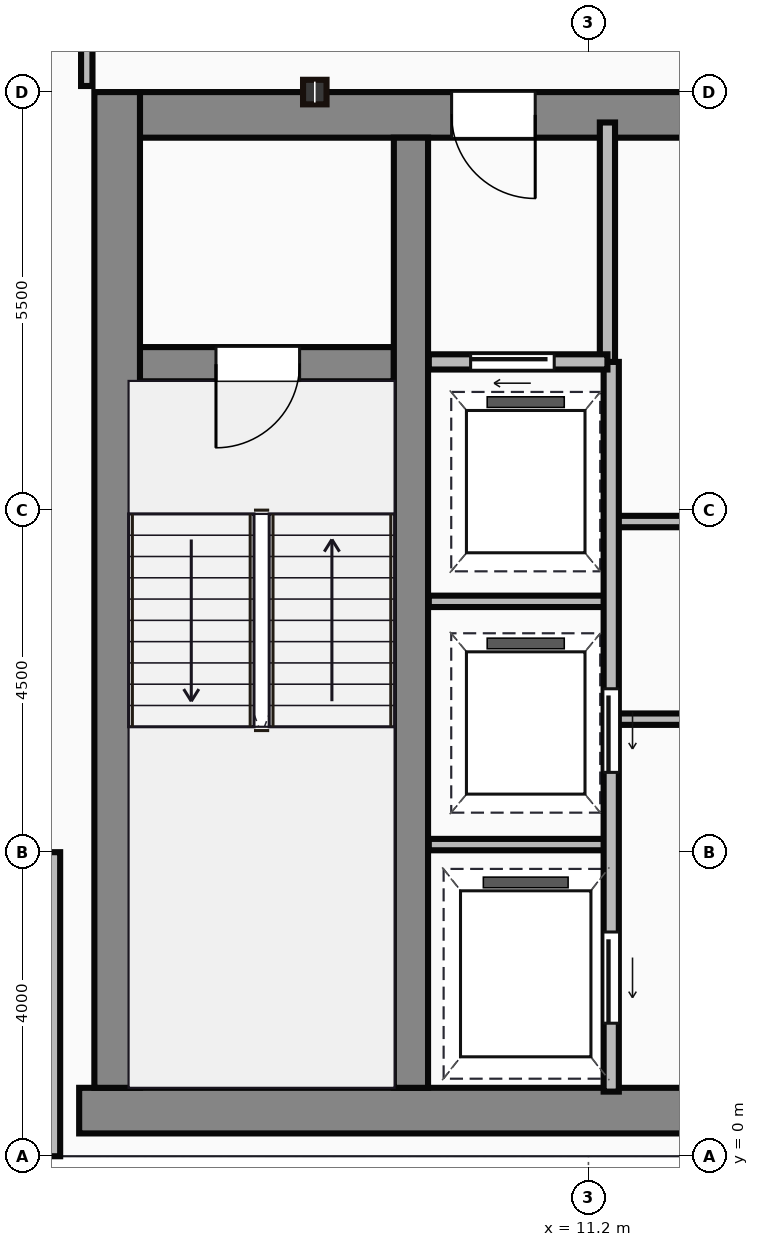
"""IFC4 building model, lengths in metres.
Left out: names, types, materials, properties, quantities, classifications, styles, units other than length and angle.
Written with IfcOpenShell. Run it as: python <this file> out.ifc"""

import sys

from ifc_helpers import new_model, si_unit, direction, frame, frame_2d, origin, origin_2d, place, context, subcontext, project, spatial, rectangle, i_section, extrude, source, transform, mapped, element, fill, save


model = new_model("IFC4")
c1 = context("Model", 3, precision=1e-05, world=origin(), true_north=direction((0.0, 1.0)))
c2 = subcontext(c1, "Body", "Model", "MODEL_VIEW")
j1 = project(units=[si_unit("LENGTHUNIT", "METRE"), si_unit("PLANEANGLEUNIT", "RADIAN")], contexts=[c1])
p1 = place(None, origin())
s1 = spatial("IfcSite", under=j1, at=p1, CompositionType="ELEMENT")
p2 = place(p1, origin())
s2 = spatial("IfcBuilding", under=s1, at=p2, CompositionType="ELEMENT")
p3 = place(p2, frame((0.0, 0.0, 206.85)))
s3 = spatial("IfcBuildingStorey", under=s2, at=p3, CompositionType="ELEMENT", Elevation=206.85)
m1 = source(origin(), c2, "Body", "SweptSolid", [
    extrude(rectangle(XDim=29.5, YDim=0.6, at=frame_2d((14.75, 0.0))), origin(), (0.0, 0.0, 1.0), 3.65),
])
p4 = place(p3, frame((4.5, 0.6, 0.0), z_axis=(0.0, 0.0, 1.0), x_axis=(1.0, 0.0, 0.0)))
e1 = element("IfcWall", 1, at=p4, inside=s3, PredefinedType="SHEAR", context=c2, shape_type="MappedRepresentation", body=[
    mapped(m1, transform((0.0, 0.0, 0.0))),
])
m2 = source(origin(), c2, "Body", "SweptSolid", [
    extrude(rectangle(XDim=13.1, YDim=0.6, at=frame_2d((6.55, 0.0))), origin(), (0.0, 0.0, 1.0), 3.65),
])
p5 = place(p3, frame((5.0, 0.9, 0.0), z_axis=(0.0, 0.0, 1.0), x_axis=(0.0, 1.0, 0.0)))
e2 = element("IfcWall", 2, at=p5, inside=s3, PredefinedType="SHEAR", context=c2, shape_type="MappedRepresentation", body=[
    mapped(m2, transform((0.0, 0.0, 0.0))),
])
m3 = source(origin(), c2, "Body", "SweptSolid", [
    extrude(rectangle(XDim=9.1, YDim=0.6, at=frame_2d((4.55, 0.0))), origin(), (0.0, 0.0, 1.0), 3.65),
])
p6 = place(p3, frame((5.3, 13.7, 0.0), z_axis=(0.0, 0.0, 1.0), x_axis=(1.0, 0.0, 0.0)))
e3 = element("IfcWall", 3, at=p6, inside=s3, PredefinedType="SHEAR", context=c2, shape_type="MappedRepresentation", body=[
    mapped(m3, transform((0.0, 0.0, 0.0))),
])
p7 = place(p6, frame((4.1, 0.0, 0.0)))
e4 = element("IfcOpeningElement", 4, at=p7, cuts=e3, PredefinedType="OPENING", context=c2, shape_type="SweptSolid", body=[
    extrude(rectangle(XDim=1.1, YDim=2.15, at=frame_2d((0.55, 1.075))), frame((0.0, 0.31, 0.0), z_axis=(0.0, -1.0, 0.0), x_axis=(1.0, 0.0, 0.0)), (0.0, 0.0, 1.0), 0.62),
])
m4 = source(origin(), c2, "Body", "SweptSolid", [
    extrude(rectangle(XDim=12.5, YDim=0.45, at=frame_2d((6.25, 0.0))), origin(), (0.0, 0.0, 1.0), 3.65),
])
p8 = place(p3, frame((8.865, 0.9, 0.0), z_axis=(0.0, 0.0, 1.0), x_axis=(0.0, 1.0, 0.0)))
e5 = element("IfcWall", 5, at=p8, inside=s3, PredefinedType="SHEAR", context=c2, shape_type="MappedRepresentation", body=[
    mapped(m4, transform((0.0, 0.0, 0.0))),
])
m5 = source(origin(), c2, "Body", "SweptSolid", [
    extrude(rectangle(XDim=3.39, YDim=0.45, at=frame_2d((1.695, 0.0))), origin(), (0.0, 0.0, 1.0), 3.65),
])
p9 = place(p3, frame((5.25, 10.42, 0.0), z_axis=(0.0, 0.0, 1.0), x_axis=(1.0, 0.0, 0.0)))
e6 = element("IfcWall", 6, at=p9, inside=s3, PredefinedType="SHEAR", context=c2, shape_type="MappedRepresentation", body=[
    mapped(m5, transform((0.0, 0.0, 0.0))),
])
p10 = place(p9, frame((1.05, 0.0, 0.0)))
e7 = element("IfcOpeningElement", 7, at=p10, cuts=e6, PredefinedType="OPENING", context=c2, shape_type="SweptSolid", body=[
    extrude(rectangle(XDim=1.1, YDim=2.15, at=frame_2d((0.55, 1.075))), frame((0.0, 0.235, 0.0), z_axis=(0.0, -1.0, 0.0), x_axis=(1.0, 0.0, 0.0)), (0.0, 0.0, 1.0), 0.47),
])
m6 = source(origin(), c2, "Body", "SweptSolid", [
    extrude(i_section(OverallWidth=0.309, OverallDepth=0.323, WebThickness=0.014, FlangeThickness=0.023, at=origin_2d()), origin(), (0.0, 0.0, 1.0), 3.65),
])
p11 = place(p3, frame((7.6, 14.0, 0.0), z_axis=(0.0, 0.0, 1.0), x_axis=(1.0, 0.0, 0.0)))
e8 = element("IfcColumn", 8, at=p11, inside=s3, PredefinedType="COLUMN", context=c2, shape_type="MappedRepresentation", body=[
    mapped(m6, transform((0.0, 0.0, 0.0))),
])
m7 = source(origin(), c2, "Body", "SweptSolid", [
    extrude(rectangle(XDim=4.0, YDim=0.25, at=frame_2d((2.0, 0.0))), origin(), (0.0, 0.0, 1.0), 3.4),
])
p12 = place(p3, frame((4.125, 4.0, 0.0), z_axis=(0.0, 0.0, 1.0), x_axis=(0.0, -1.0, 0.0)))
e9 = element("IfcWall", 9, at=p12, inside=s3, PredefinedType="STANDARD", context=c2, shape_type="MappedRepresentation", body=[
    mapped(m7, transform((0.0, 0.0, 0.0))),
])
m8 = source(origin(), c2, "Body", "SweptSolid", [
    extrude(rectangle(XDim=3.18, YDim=0.2, at=frame_2d((1.59, 0.0))), origin(), (0.0, 0.0, 1.0), 3.4),
])
p13 = place(p3, frame((11.45, 10.42, 0.0), z_axis=(0.0, 0.0, 1.0), x_axis=(0.0, 1.0, 0.0)))
e10 = element("IfcWall", 10, at=p13, inside=s3, PredefinedType="PARTITIONING", context=c2, shape_type="MappedRepresentation", body=[
    mapped(m8, transform((0.0, 0.0, 0.0))),
])
m9 = source(origin(), c2, "Body", "SweptSolid", [
    extrude(rectangle(XDim=2.35, YDim=0.2, at=frame_2d((1.175, 0.0))), origin(), (0.0, 0.0, 1.0), 3.4),
])
p14 = place(p3, frame((9.1, 10.45, 0.0), z_axis=(0.0, 0.0, 1.0), x_axis=(1.0, 0.0, 0.0)))
e11 = element("IfcWall", 11, at=p14, inside=s3, PredefinedType="PARTITIONING", context=c2, shape_type="MappedRepresentation", body=[
    mapped(m9, transform((0.0, 0.0, 0.0))),
])
p15 = place(p14, frame((0.55, 0.0, 0.0)))
e12 = element("IfcOpeningElement", 12, at=p15, cuts=e11, PredefinedType="OPENING", context=c2, shape_type="SweptSolid", body=[
    extrude(rectangle(XDim=1.1, YDim=2.15, at=frame_2d((0.55, 1.075))), frame((0.0, 0.11, 0.0), z_axis=(0.0, -1.0, 0.0), x_axis=(1.0, 0.0, 0.0)), (0.0, 0.0, 1.0), 0.22),
])
m10 = source(origin(), c2, "Body", "SweptSolid", [
    extrude(rectangle(XDim=9.6, YDim=0.2, at=frame_2d((4.8, 0.0))), origin(), (0.0, 0.0, 1.0), 3.4),
])
p16 = place(p3, frame((11.5, 0.85, 0.0), z_axis=(0.0, 0.0, 1.0), x_axis=(0.0, 1.0, 0.0)))
e13 = element("IfcWall", 13, at=p16, inside=s3, PredefinedType="PARTITIONING", context=c2, shape_type="MappedRepresentation", body=[
    mapped(m10, transform((0.0, 0.0, 0.0))),
])
p17 = place(p16, frame((4.2, 0.0, 0.0)))
e14 = element("IfcOpeningElement", 14, at=p17, cuts=e13, PredefinedType="OPENING", context=c2, shape_type="SweptSolid", body=[
    extrude(rectangle(XDim=1.1, YDim=2.15, at=frame_2d((0.55, 1.075))), frame((0.0, 0.11, 0.0), z_axis=(0.0, -1.0, 0.0), x_axis=(1.0, 0.0, 0.0)), (0.0, 0.0, 1.0), 0.22),
])
p18 = place(p16, frame((0.9, 0.0, 0.0)))
e15 = element("IfcOpeningElement", 15, at=p18, cuts=e13, PredefinedType="OPENING", context=c2, shape_type="SweptSolid", body=[
    extrude(rectangle(XDim=1.2, YDim=2.15, at=frame_2d((0.6, 1.075))), frame((0.0, 0.11, 0.0), z_axis=(0.0, -1.0, 0.0), x_axis=(1.0, 0.0, 0.0)), (0.0, 0.0, 1.0), 0.22),
])
m11 = source(origin(), c2, "Body", "SweptSolid", [
    extrude(rectangle(XDim=2.4, YDim=0.15, at=frame_2d((1.2, 0.0))), origin(), (0.0, 0.0, 1.0), 3.4),
])
for number, where, z_axis, x_axis in (
    (16, (9.1, 4.1, 0.0), (0.0, 0.0, 1.0), (1.0, 0.0, 0.0)),
    (17, (9.1, 7.3, 0.0), (0.0, 0.0, 1.0), (1.0, 0.0, 0.0)),
):
    element("IfcWall", number, at=place(p3, frame(where, z_axis=z_axis, x_axis=x_axis)), inside=s3, PredefinedType="PARTITIONING", context=c2, shape_type="MappedRepresentation", body=[
        mapped(m11, transform((0.0, 0.0, 0.0))),
    ])
m12 = source(origin(), c2, "Body", "SweptSolid", [
    extrude(rectangle(XDim=11.85, YDim=0.15, at=frame_2d((5.925, 0.0))), origin(), (0.0, 0.0, 1.0), 3.4),
])
p19 = place(p3, frame((11.55, 5.75, 0.0), z_axis=(0.0, 0.0, 1.0), x_axis=(1.0, 0.0, 0.0)))
e18 = element("IfcWall", 18, at=p19, inside=s3, PredefinedType="PARTITIONING", context=c2, shape_type="MappedRepresentation", body=[
    mapped(m12, transform((0.0, 0.0, 0.0))),
])
p20 = place(p3, frame((11.55, 8.35, 0.0), z_axis=(0.0, 0.0, 1.0), x_axis=(1.0, 0.0, 0.0)))
e19 = element("IfcWall", 19, at=p20, inside=s3, PredefinedType="PARTITIONING", context=c2, shape_type="MappedRepresentation", body=[
    mapped(m12, transform((0.0, 0.0, 0.0))),
])
p21 = place(p20, frame((1.1, 0.0, 0.0)))
e20 = element("IfcOpeningElement", 20, at=p21, cuts=e19, PredefinedType="OPENING", context=c2, shape_type="SweptSolid", body=[
    extrude(rectangle(XDim=0.95, YDim=2.15, at=frame_2d((0.475, 1.075))), frame((0.0, 0.085, 0.0), z_axis=(0.0, -1.0, 0.0), x_axis=(1.0, 0.0, 0.0)), (0.0, 0.0, 1.0), 0.17),
])
p22 = place(p20, frame((9.4, 0.0, 0.0)))
e21 = element("IfcOpeningElement", 21, at=p22, cuts=e19, PredefinedType="OPENING", context=c2, shape_type="SweptSolid", body=[
    extrude(rectangle(XDim=0.95, YDim=2.15, at=frame_2d((0.475, 1.075))), frame((0.0, 0.085, 0.0), z_axis=(0.0, -1.0, 0.0), x_axis=(1.0, 0.0, 0.0)), (0.0, 0.0, 1.0), 0.17),
])
m13 = source(origin(), c2, "Body", "SweptSolid", [
    extrude(rectangle(XDim=2.12, YDim=0.15, at=frame_2d((1.06, 0.0))), origin(), (0.0, 0.0, 1.0), 3.4),
])
p23 = place(p3, frame((4.6, 14.08, 0.0), z_axis=(0.0, 0.0, 1.0), x_axis=(0.0, 1.0, 0.0)))
e22 = element("IfcWall", 22, at=p23, inside=s3, PredefinedType="PARTITIONING", context=c2, shape_type="MappedRepresentation", body=[
    mapped(m13, transform((0.0, 0.0, 0.0))),
])
m14 = source(origin(), c2, "Body", "SweptSolid", [
    extrude(rectangle(XDim=1.1, YDim=2.15, at=frame_2d((0.55, 1.075))), frame((0.0, 0.025, 0.0), z_axis=(0.0, -1.0, 0.0), x_axis=(1.0, 0.0, 0.0)), (0.0, 0.0, 1.0), 0.05),
])
p24 = place(p10, frame((1.1, 0.0, 0.0), z_axis=(0.0, 0.0, 1.0), x_axis=(-1.0, 0.0, 0.0)))
e23 = element("IfcDoor", 23, at=p24, inside=s3, OperationType="SINGLE_SWING_LEFT", PredefinedType="DOOR", context=c2, shape_type="MappedRepresentation", body=[
    mapped(m14, transform((0.0, 0.0, 0.0))),
])
fill(e7, e23)
p25 = place(p7, origin())
e24 = element("IfcDoor", 24, at=p25, inside=s3, OperationType="SINGLE_SWING_RIGHT", PredefinedType="DOOR", context=c2, shape_type="MappedRepresentation", body=[
    mapped(m14, transform((0.0, 0.0, 0.0))),
])
fill(e4, e24)
p26 = place(p15, origin())
e25 = element("IfcDoor", 25, at=p26, inside=s3, OperationType="SLIDING_TO_LEFT", PredefinedType="DOOR", context=c2, shape_type="MappedRepresentation", body=[
    mapped(m14, transform((0.0, 0.0, 0.0))),
])
fill(e12, e25)
p27 = place(p17, frame((1.1, 0.0, 0.0), z_axis=(0.0, 0.0, 1.0), x_axis=(-1.0, 0.0, 0.0)))
e26 = element("IfcDoor", 26, at=p27, inside=s3, OperationType="SLIDING_TO_LEFT", PredefinedType="DOOR", context=c2, shape_type="MappedRepresentation", body=[
    mapped(m14, transform((0.0, 0.0, 0.0))),
])
fill(e14, e26)
m15 = source(origin(), c2, "Body", "SweptSolid", [
    extrude(rectangle(XDim=1.2, YDim=2.15, at=frame_2d((0.6, 1.075))), frame((0.0, 0.025, 0.0), z_axis=(0.0, -1.0, 0.0), x_axis=(1.0, 0.0, 0.0)), (0.0, 0.0, 1.0), 0.05),
])
p28 = place(p18, frame((1.2, 0.0, 0.0), z_axis=(0.0, 0.0, 1.0), x_axis=(-1.0, 0.0, 0.0)))
e27 = element("IfcDoor", 27, at=p28, inside=s3, OperationType="SLIDING_TO_LEFT", PredefinedType="DOOR", context=c2, shape_type="MappedRepresentation", body=[
    mapped(m15, transform((0.0, 0.0, 0.0))),
])
fill(e15, e27)
save(model, sys.argv[1])
